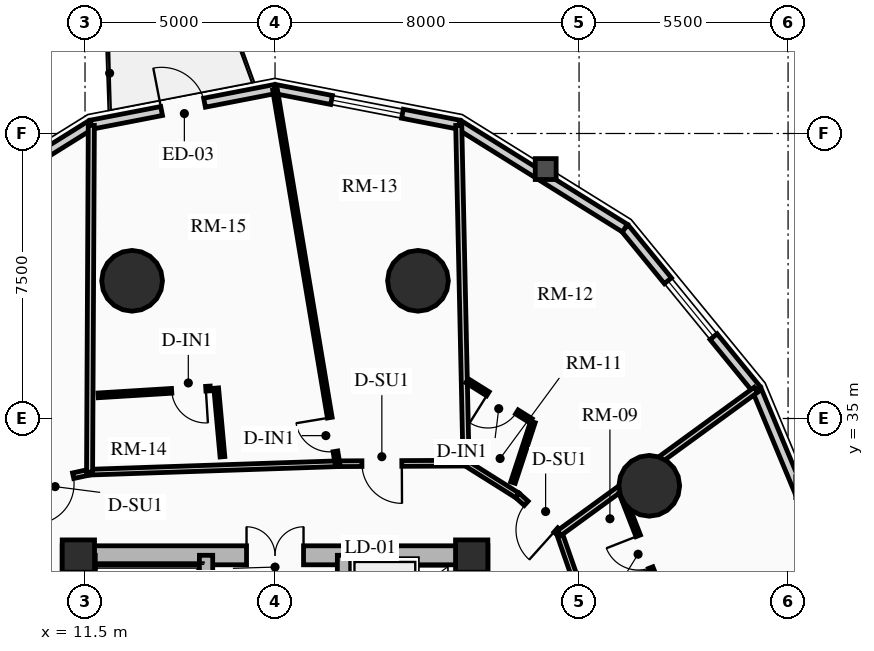
"""IFC4 building model, lengths in metres.
Left out: names, types, materials, properties, quantities, classifications, styles, units other than length and angle.
Written with IfcOpenShell. Run it as: python <this file> out.ifc"""

import sys

from ifc_helpers import new_model, si_unit, direction, frame, frame_2d, origin, origin_2d, place, context, subcontext, project, spatial, rectangle, circle, extrude, source, transform, mapped, element, fill, save


model = new_model("IFC4")
c1 = context("Model", 3, precision=1e-05, world=origin(), true_north=direction((0.0, 1.0)))
c2 = subcontext(c1, "Body", "Model", "MODEL_VIEW")
j1 = project(units=[si_unit("LENGTHUNIT", "METRE"), si_unit("PLANEANGLEUNIT", "RADIAN")], contexts=[c1])
p1 = place(None, origin())
s1 = spatial("IfcSite", under=j1, at=p1, CompositionType="ELEMENT")
p2 = place(p1, origin())
s2 = spatial("IfcBuilding", under=s1, at=p2, CompositionType="ELEMENT")
p3 = place(p2, frame((0.0, 0.0, 51.1)))
s3 = spatial("IfcBuildingStorey", under=s2, at=p3, CompositionType="ELEMENT", Elevation=51.1)
for number, where, z_axis, x_axis in (
    (1, (11.15, 17.35, 0.0), (0.0, 0.0, 1.0), (0.0, 1.0, 0.0)),
    (2, (21.85, 17.35, 0.0), (0.0, 0.0, 1.0), (0.0, 1.0, 0.0)),
):
    element("IfcWall", number, at=place(p3, frame(where, z_axis=z_axis, x_axis=x_axis)), inside=s3, PredefinedType="SHEAR", context=c2, shape_type="SweptSolid", body=[
        extrude(rectangle(XDim=14.3, YDim=0.5, at=frame_2d((7.15, 0.0))), origin(), (0.0, 0.0, 1.0), 2.91),
    ])
p4 = place(p3, frame((11.15, 31.4, 0.0), z_axis=(0.0, 0.0, 1.0), x_axis=(1.0, 0.0, 0.0)))
e3 = element("IfcWall", 3, at=p4, inside=s3, PredefinedType="SHEAR", context=c2, shape_type="SweptSolid", body=[
    extrude(rectangle(XDim=10.7, YDim=0.5, at=frame_2d((5.35, 0.0))), origin(), (0.0, 0.0, 1.0), 2.91),
])
m1 = source(origin(), c2, "Body", "SweptSolid", [
    extrude(rectangle(XDim=1.5, YDim=2.02, at=frame_2d((0.75, 1.01))), frame((0.0, 0.26, 0.0), z_axis=(0.0, -1.0, 0.0), x_axis=(1.0, 0.0, 0.0)), (0.0, 0.0, 1.0), 0.52),
])
p5 = place(p4, frame((4.6, 0.0, 0.0)))
e4 = element("IfcOpeningElement", 4, at=p5, cuts=e3, PredefinedType="OPENING", context=c2, shape_type="MappedRepresentation", body=[
    mapped(m1, transform((0.0, 0.0, 0.0), x_axis=(1.0, 0.0, 0.0), y_axis=(0.0, 1.0, 0.0), z_axis=(0.0, 0.0, 1.0), scale=1.0)),
])
p6 = place(p3, frame((14.685, 17.6, 0.0), z_axis=(0.0, 0.0, 1.0), x_axis=(0.0, 1.0, 0.0)))
e5 = element("IfcWall", 5, at=p6, inside=s3, PredefinedType="SHEAR", context=c2, shape_type="SweptSolid", body=[
    extrude(rectangle(XDim=13.8, YDim=0.35, at=frame_2d((6.9, 0.0))), origin(), (0.0, 0.0, 1.0), 2.91),
])
m2 = source(origin(), c2, "Body", "SweptSolid", [
    extrude(rectangle(XDim=1.1, YDim=2.015, at=frame_2d((0.55, 1.007))), frame((0.0, 0.185, 0.0), z_axis=(0.0, -1.0, 0.0), x_axis=(1.0, 0.0, 0.0)), (0.0, 0.0, 1.0), 0.37),
])
p7 = place(p6, frame((4.9, 0.0, 0.0)))
e6 = element("IfcOpeningElement", 6, at=p7, cuts=e5, PredefinedType="OPENING", context=c2, shape_type="MappedRepresentation", body=[
    mapped(m2, transform((0.0, 0.0, 0.0), x_axis=(1.0, 0.0, 0.0), y_axis=(0.0, 1.0, 0.0), z_axis=(0.0, 0.0, 1.0), scale=1.0)),
])
m3 = source(origin(), c2, "Body", "SweptSolid", [
    extrude(rectangle(XDim=1.15, YDim=2.02, at=frame_2d((0.575, 1.01))), frame((0.0, 0.185, 0.0), z_axis=(0.0, -1.0, 0.0), x_axis=(1.0, 0.0, 0.0)), (0.0, 0.0, 1.0), 0.37),
])
p8 = place(p6, frame((7.32, 0.0, 0.0)))
e7 = element("IfcOpeningElement", 7, at=p8, cuts=e5, PredefinedType="OPENING", context=c2, shape_type="MappedRepresentation", body=[
    mapped(m3, transform((0.0, 0.0, 0.0), x_axis=(1.0, 0.0, 0.0), y_axis=(0.0, 1.0, 0.0), z_axis=(0.0, 0.0, 1.0), scale=1.0)),
])
p9 = place(p3, frame((18.315, 17.6, 0.0), z_axis=(0.0, 0.0, 1.0), x_axis=(0.0, 1.0, 0.0)))
e8 = element("IfcWall", 8, at=p9, inside=s3, PredefinedType="SHEAR", context=c2, shape_type="SweptSolid", body=[
    extrude(rectangle(XDim=13.8, YDim=0.35, at=frame_2d((6.9, 0.0))), origin(), (0.0, 0.0, 1.0), 2.91),
])
p10 = place(p9, frame((10.025, 0.0, 0.0)))
e9 = element("IfcOpeningElement", 9, at=p10, cuts=e8, PredefinedType="OPENING", context=c2, shape_type="MappedRepresentation", body=[
    mapped(m2, transform((0.0, 0.0, 0.0), x_axis=(1.0, 0.0, 0.0), y_axis=(0.0, 1.0, 0.0), z_axis=(0.0, 0.0, 1.0), scale=1.0)),
])
p11 = place(p9, frame((12.025, 0.0, 0.0)))
e10 = element("IfcOpeningElement", 10, at=p11, cuts=e8, PredefinedType="OPENING", context=c2, shape_type="MappedRepresentation", body=[
    mapped(m2, transform((0.0, 0.0, 0.0), x_axis=(1.0, 0.0, 0.0), y_axis=(0.0, 1.0, 0.0), z_axis=(0.0, 0.0, 1.0), scale=1.0)),
])
p12 = place(p9, frame((5.33, 0.0, 0.0)))
e11 = element("IfcOpeningElement", 11, at=p12, cuts=e8, PredefinedType="OPENING", context=c2, shape_type="MappedRepresentation", body=[
    mapped(m3, transform((0.0, 0.0, 0.0), x_axis=(1.0, 0.0, 0.0), y_axis=(0.0, 1.0, 0.0), z_axis=(0.0, 0.0, 1.0), scale=1.0)),
])
p13 = place(p3, frame((11.595, 24.655, 0.0), z_axis=(0.0, 0.0, 1.0), x_axis=(0.0, 1.0, 0.0)))
e12 = element("IfcWall", 12, at=p13, inside=s3, PredefinedType="SHEAR", context=c2, shape_type="SweptSolid", body=[
    extrude(rectangle(XDim=6.745, YDim=0.35, at=frame_2d((3.373, 0.0))), origin(), (0.0, 0.0, 1.0), 2.91),
])
for number, where, z_axis, x_axis in (
    (13, (11.325, 31.38, 0.0), (0.0, 0.0, 1.0), (1.0, 0.0, 0.0)),
    (14, (21.675, 31.38, 0.0), (0.0, 0.0, 1.0), (1.0, 0.0, 0.0)),
):
    element("IfcColumn", number, at=place(p3, frame(where, z_axis=z_axis, x_axis=x_axis)), inside=s3, PredefinedType="COLUMN", context=c2, shape_type="SweptSolid", body=[
        extrude(rectangle(XDim=0.85, YDim=0.85, at=origin_2d()), origin(), (0.0, 0.0, 1.0), 2.91),
    ])
for number, where, z_axis, x_axis in (
    (15, (26.347, 33.229, 0.0), (0.0, 0.0, 1.0), (1.0, 0.0, 0.0)),
    (16, (20.261, 38.623, 0.0), (0.0, 0.0, 1.0), (1.0, 0.0, 0.0)),
    (17, (12.739, 38.623, 0.0), (0.0, 0.0, 1.0), (1.0, 0.0, 0.0)),
):
    element("IfcColumn", number, at=place(p3, frame(where, z_axis=z_axis, x_axis=x_axis)), inside=s3, PredefinedType="USERDEFINED", context=c2, shape_type="SweptSolid", body=[
        extrude(circle(Radius=0.8, at=origin_2d()), origin(), (0.0, 0.0, 1.0), 2.91),
    ])
p14 = place(p3, frame((29.172, 35.768, 0.0), z_axis=(0.0, 0.0, 1.0), x_axis=(0.384348836956, -0.923187939442, 0.0)))
e18 = element("IfcWall", 18, at=p14, inside=s3, PredefinedType="SOLIDWALL", context=c2, shape_type="SweptSolid", body=[
    extrude(rectangle(XDim=5.789, YDim=0.24, at=frame_2d((2.894, 0.0))), origin(), (0.0, 0.0, 1.0), 2.073),
])
p15 = place(p3, frame((25.707, 40.009, 0.0), z_axis=(0.0, 0.0, 1.0), x_axis=(0.632713287022, -0.77438614168, 0.0)))
e19 = element("IfcWall", 19, at=p15, inside=s3, PredefinedType="SOLIDWALL", context=c2, shape_type="SweptSolid", body=[
    extrude(rectangle(XDim=5.477, YDim=0.24, at=frame_2d((2.738, 0.0))), origin(), (0.0, 0.0, 1.0), 2.073),
])
m4 = source(origin(), c2, "Body", "SweptSolid", [
    extrude(rectangle(XDim=1.9, YDim=1.35, at=frame_2d((0.95, 0.675))), frame((0.0, 0.13, 0.0), z_axis=(0.0, -1.0, 0.0), x_axis=(1.0, 0.0, 0.0)), (0.0, 0.0, 1.0), 0.26),
])
p16 = place(p15, frame((1.788, 0.0, 0.65)))
e20 = element("IfcOpeningElement", 20, at=p16, cuts=e19, PredefinedType="OPENING", context=c2, shape_type="MappedRepresentation", body=[
    mapped(m4, transform((0.0, 0.0, 0.0), x_axis=(1.0, 0.0, 0.0), y_axis=(0.0, 1.0, 0.0), z_axis=(0.0, 0.0, 1.0), scale=1.0)),
])
p17 = place(p3, frame((21.34, 42.732, 0.0), z_axis=(0.0, 0.0, 1.0), x_axis=(0.848533613342, -0.529141481107, 0.0)))
e21 = element("IfcWall", 21, at=p17, inside=s3, PredefinedType="SOLIDWALL", context=c2, shape_type="SweptSolid", body=[
    extrude(rectangle(XDim=5.146, YDim=0.24, at=frame_2d((2.573, 0.0))), origin(), (0.0, 0.0, 1.0), 2.073),
])
p18 = place(p3, frame((16.5, 43.67, 0.0), z_axis=(0.0, 0.0, 1.0), x_axis=(0.981725274071, -0.190303668512, 0.0)))
e22 = element("IfcWall", 22, at=p18, inside=s3, PredefinedType="SOLIDWALL", context=c2, shape_type="SweptSolid", body=[
    extrude(rectangle(XDim=4.93, YDim=0.24, at=frame_2d((2.465, 0.0))), origin(), (0.0, 0.0, 1.0), 2.073),
])
p19 = place(p18, frame((1.515, 0.0, 0.65)))
e23 = element("IfcOpeningElement", 23, at=p19, cuts=e22, PredefinedType="OPENING", context=c2, shape_type="MappedRepresentation", body=[
    mapped(m4, transform((0.0, 0.0, 0.0), x_axis=(1.0, 0.0, 0.0), y_axis=(0.0, 1.0, 0.0), z_axis=(0.0, 0.0, 1.0), scale=1.0)),
])
p20 = place(p3, frame((11.66, 42.732, 0.0), z_axis=(0.0, 0.0, 1.0), x_axis=(0.981725274071, 0.190303668512, 0.0)))
e24 = element("IfcWall", 24, at=p20, inside=s3, PredefinedType="SOLIDWALL", context=c2, shape_type="SweptSolid", body=[
    extrude(rectangle(XDim=4.93, YDim=0.24, at=frame_2d((2.465, 0.0))), origin(), (0.0, 0.0, 1.0), 2.073),
])
m5 = source(origin(), c2, "Body", "SweptSolid", [
    extrude(rectangle(XDim=1.15, YDim=2.005, at=frame_2d((0.575, 1.002))), frame((0.0, 0.13, 0.0), z_axis=(0.0, -1.0, 0.0), x_axis=(1.0, 0.0, 0.0)), (0.0, 0.0, 1.0), 0.26),
])
p21 = place(p20, frame((1.89, 0.0, 0.0)))
e25 = element("IfcOpeningElement", 25, at=p21, cuts=e24, PredefinedType="OPENING", context=c2, shape_type="MappedRepresentation", body=[
    mapped(m5, transform((0.0, 0.0, 0.0), x_axis=(1.0, 0.0, 0.0), y_axis=(0.0, 1.0, 0.0), z_axis=(0.0, 0.0, 1.0), scale=1.0)),
])
p22 = place(p3, frame((7.293, 40.009, 0.0), z_axis=(0.0, 0.0, 1.0), x_axis=(0.848533613342, 0.529141481107, 0.0)))
e26 = element("IfcWall", 26, at=p22, inside=s3, PredefinedType="SOLIDWALL", context=c2, shape_type="SweptSolid", body=[
    extrude(rectangle(XDim=5.146, YDim=0.24, at=frame_2d((2.573, 0.0))), origin(), (0.0, 0.0, 1.0), 2.073),
])
p23 = place(p3, frame((24.469, 30.582, 0.0), z_axis=(0.0, 0.0, 1.0), x_axis=(-0.328902536986, 0.944363871166, 0.0)))
e27 = element("IfcWall", 27, at=p23, inside=s3, PredefinedType="PARTITIONING", context=c2, shape_type="SweptSolid", body=[
    extrude(rectangle(XDim=1.488, YDim=0.15, at=frame_2d((0.744, 0.0))), origin(), (0.0, 0.0, 1.0), 2.205),
])
p24 = place(p3, frame((23.98, 31.987, 0.0), z_axis=(0.0, 0.0, 1.0), x_axis=(-0.744317922268, 0.667825449193, 0.0)))
e28 = element("IfcWall", 28, at=p24, inside=s3, PredefinedType="PARTITIONING", context=c2, shape_type="SweptSolid", body=[
    extrude(rectangle(XDim=1.481, YDim=0.15, at=frame_2d((0.74, 0.0))), origin(), (0.0, 0.0, 1.0), 2.159),
])
m6 = source(origin(), c2, "Body", "SweptSolid", [
    extrude(rectangle(XDim=1.05, YDim=2.015, at=frame_2d((0.525, 1.007))), frame((0.0, 0.085, 0.0), z_axis=(0.0, -1.0, 0.0), x_axis=(1.0, 0.0, 0.0)), (0.0, 0.0, 1.0), 0.17),
])
p25 = place(p24, frame((0.12, 0.0, 0.0)))
e29 = element("IfcOpeningElement", 29, at=p25, cuts=e28, PredefinedType="OPENING", context=c2, shape_type="MappedRepresentation", body=[
    mapped(m6, transform((0.0, 0.0, 0.0), x_axis=(1.0, 0.0, 0.0), y_axis=(0.0, 1.0, 0.0), z_axis=(0.0, 0.0, 1.0), scale=1.0)),
])
p26 = place(p3, frame((22.877, 32.976, 0.0), z_axis=(0.0, 0.0, 1.0), x_axis=(-0.846723232687, 0.532033614754, 0.0)))
e30 = element("IfcWall", 30, at=p26, inside=s3, PredefinedType="PARTITIONING", context=c2, shape_type="SweptSolid", body=[
    extrude(rectangle(XDim=1.595, YDim=0.15, at=frame_2d((0.797, 0.0))), origin(), (0.0, 0.0, 1.0), 2.205),
])
p27 = place(p3, frame((21.527, 33.824, 0.0), z_axis=(0.0, 0.0, 1.0), x_axis=(-0.999990631344, -0.00432865146, 0.0)))
e31 = element("IfcWall", 31, at=p27, inside=s3, PredefinedType="PARTITIONING", context=c2, shape_type="SweptSolid", body=[
    extrude(rectangle(XDim=3.384, YDim=0.15, at=frame_2d((1.692, 0.0))), origin(), (0.0, 0.0, 1.0), 2.159),
])
p28 = place(p27, frame((1.69, 0.0, 0.0)))
e32 = element("IfcOpeningElement", 32, at=p28, cuts=e31, PredefinedType="OPENING", context=c2, shape_type="MappedRepresentation", body=[
    mapped(m6, transform((0.0, 0.0, 0.0), x_axis=(1.0, 0.0, 0.0), y_axis=(0.0, 1.0, 0.0), z_axis=(0.0, 0.0, 1.0), scale=1.0)),
])
p29 = place(p3, frame((18.143, 33.81, 0.0), z_axis=(0.0, 0.0, 1.0), x_axis=(-0.999423023908, -0.033964971394, 0.0)))
e33 = element("IfcWall", 33, at=p29, inside=s3, PredefinedType="PARTITIONING", context=c2, shape_type="SweptSolid", body=[
    extrude(rectangle(XDim=6.527, YDim=0.15, at=frame_2d((3.263, 0.0))), origin(), (0.0, 0.0, 1.0), 2.159),
])
p30 = place(p3, frame((11.62, 33.588, 0.0), z_axis=(0.0, 0.0, 1.0), x_axis=(-0.977392314559, -0.211433827571, 0.0)))
e34 = element("IfcWall", 34, at=p30, inside=s3, PredefinedType="PARTITIONING", context=c2, shape_type="SweptSolid", body=[
    extrude(rectangle(XDim=1.934, YDim=0.15, at=frame_2d((0.967, 0.0))), origin(), (0.0, 0.0, 1.0), 2.159),
])
p31 = place(p30, frame((0.442, 0.0, 0.0)))
e35 = element("IfcOpeningElement", 35, at=p31, cuts=e34, PredefinedType="OPENING", context=c2, shape_type="MappedRepresentation", body=[
    mapped(m6, transform((0.0, 0.0, 0.0), x_axis=(1.0, 0.0, 0.0), y_axis=(0.0, 1.0, 0.0), z_axis=(0.0, 0.0, 1.0), scale=1.0)),
])
p32 = place(p3, frame((23.98, 31.987, 0.0), z_axis=(0.0, 0.0, 1.0), x_axis=(0.80834018144, 0.588715679313, 0.0)))
e36 = element("IfcWall", 36, at=p32, inside=s3, PredefinedType="PARTITIONING", context=c2, shape_type="SweptSolid", body=[
    extrude(rectangle(XDim=6.403, YDim=0.16, at=frame_2d((3.202, 0.0))), origin(), (0.0, 0.0, 1.0), 2.073),
])
p33 = place(p3, frame((21.527, 33.824, 0.0), z_axis=(0.0, 0.0, 1.0), x_axis=(-0.021694017061, 0.999764657119, 0.0)))
e37 = element("IfcWall", 37, at=p33, inside=s3, PredefinedType="PARTITIONING", context=c2, shape_type="SweptSolid", body=[
    extrude(rectangle(XDim=8.891, YDim=0.16, at=frame_2d((4.445, 0.0))), origin(), (0.0, 0.0, 1.0), 2.073),
])
p34 = place(p3, frame((11.62, 33.588, 0.0), z_axis=(0.0, 0.0, 1.0), x_axis=(0.005056791532, 0.999987214348, 0.0)))
e38 = element("IfcWall", 38, at=p34, inside=s3, PredefinedType="PARTITIONING", context=c2, shape_type="SweptSolid", body=[
    extrude(rectangle(XDim=9.125, YDim=0.16, at=frame_2d((4.562, 0.0))), origin(), (0.0, 0.0, 1.0), 2.073),
])
p35 = place(p3, frame((26.428, 30.963, 0.0), z_axis=(0.0, 0.0, 1.0), x_axis=(-0.364149471566, 0.931340519014, 0.0)))
e39 = element("IfcWall", 39, at=p35, inside=s3, PredefinedType="PARTITIONING", context=c2, shape_type="SweptSolid", body=[
    extrude(rectangle(XDim=2.247, YDim=0.125, at=frame_2d((1.124, 0.0))), origin(), (0.0, 0.0, 1.0), 2.159),
])
m7 = source(origin(), c2, "Body", "SweptSolid", [
    extrude(rectangle(XDim=0.9, YDim=2.005, at=frame_2d((0.45, 1.002))), frame((0.0, 0.073, 0.0), z_axis=(0.0, -1.0, 0.0), x_axis=(1.0, 0.0, 0.0)), (0.0, 0.0, 1.0), 0.145),
])
p36 = place(p35, frame((0.12, 0.0, 0.0)))
e40 = element("IfcOpeningElement", 40, at=p36, cuts=e39, PredefinedType="OPENING", context=c2, shape_type="MappedRepresentation", body=[
    mapped(m7, transform((0.0, 0.0, 0.0), x_axis=(1.0, 0.0, 0.0), y_axis=(0.0, 1.0, 0.0), z_axis=(0.0, 0.0, 1.0), scale=1.0)),
])
p37 = place(p3, frame((22.76, 33.313, 0.0), z_axis=(0.0, 0.0, 1.0), x_axis=(0.312649886595, 0.949868437423, 0.0)))
e41 = element("IfcWall", 41, at=p37, inside=s3, PredefinedType="PARTITIONING", context=c2, shape_type="SweptSolid", body=[
    extrude(rectangle(XDim=1.68, YDim=0.125, at=frame_2d((0.84, 0.0))), origin(), (0.0, 0.0, 1.0), 2.205),
])
p38 = place(p3, frame((23.233, 34.941, 0.0), z_axis=(0.0, 0.0, 1.0), x_axis=(-0.84760373009, 0.53062973601, 0.0)))
e42 = element("IfcWall", 42, at=p38, inside=s3, PredefinedType="PARTITIONING", context=c2, shape_type="SweptSolid", body=[
    extrude(rectangle(XDim=1.983, YDim=0.125, at=frame_2d((0.991, 0.0))), origin(), (0.0, 0.0, 1.0), 2.635),
])
p39 = place(p38, frame((0.436, 0.0, 0.0)))
e43 = element("IfcOpeningElement", 43, at=p39, cuts=e42, PredefinedType="OPENING", context=c2, shape_type="MappedRepresentation", body=[
    mapped(m7, transform((0.0, 0.0, 0.0), x_axis=(1.0, 0.0, 0.0), y_axis=(0.0, 1.0, 0.0), z_axis=(0.0, 0.0, 1.0), scale=1.0)),
])
p40 = place(p3, frame((18.143, 33.81, 0.0), z_axis=(0.0, 0.0, 1.0), x_axis=(-0.164668829219, 0.986348912243, 0.0)))
e44 = element("IfcWall", 44, at=p40, inside=s3, PredefinedType="PARTITIONING", context=c2, shape_type="SweptSolid", body=[
    extrude(rectangle(XDim=9.977, YDim=0.125, at=frame_2d((4.988, 0.0))), origin(), (0.0, 0.0, 1.0), 2.073),
])
p41 = place(p40, frame((0.33, 0.0, 0.0)))
e45 = element("IfcOpeningElement", 45, at=p41, cuts=e44, PredefinedType="OPENING", context=c2, shape_type="MappedRepresentation", body=[
    mapped(m7, transform((0.0, 0.0, 0.0), x_axis=(1.0, 0.0, 0.0), y_axis=(0.0, 1.0, 0.0), z_axis=(0.0, 0.0, 1.0), scale=1.0)),
])
p42 = place(p3, frame((15.116, 33.993, 0.0), z_axis=(0.0, 0.0, 1.0), x_axis=(-0.090547877021, 0.995892103577, 0.0)))
e46 = element("IfcWall", 46, at=p42, inside=s3, PredefinedType="PARTITIONING", context=c2, shape_type="SweptSolid", body=[
    extrude(rectangle(XDim=1.815, YDim=0.125, at=frame_2d((0.907, 0.0))), origin(), (0.0, 0.0, 1.0), 2.635),
])
p43 = place(p3, frame((14.798, 35.791, 0.0), z_axis=(0.0, 0.0, 1.0), x_axis=(-0.998108365817, -0.06147918417, 0.0)))
e47 = element("IfcWall", 47, at=p43, inside=s3, PredefinedType="PARTITIONING", context=c2, shape_type="SweptSolid", body=[
    extrude(rectangle(XDim=2.958, YDim=0.125, at=frame_2d((1.479, 0.0))), origin(), (0.0, 0.0, 1.0), 2.159),
])
p44 = place(p43, frame((0.12, 0.0, 0.0)))
e48 = element("IfcOpeningElement", 48, at=p44, cuts=e47, PredefinedType="OPENING", context=c2, shape_type="MappedRepresentation", body=[
    mapped(m7, transform((0.0, 0.0, 0.0), x_axis=(1.0, 0.0, 0.0), y_axis=(0.0, 1.0, 0.0), z_axis=(0.0, 0.0, 1.0), scale=1.0)),
])
m8 = source(origin(), c2, "Body", "SweptSolid", [
    extrude(rectangle(XDim=1.9, YDim=1.35, at=frame_2d((0.95, 0.675))), frame((0.0, 0.03, 0.0), z_axis=(0.0, -1.0, 0.0), x_axis=(1.0, 0.0, 0.0)), (0.0, 0.0, 1.0), 0.06),
])
p45 = place(p16, origin())
e49 = element("IfcWindow", 49, at=p45, inside=s3, PartitioningType="DOUBLE_PANEL_VERTICAL", PredefinedType="WINDOW", context=c2, shape_type="MappedRepresentation", body=[
    mapped(m8, transform((0.0, 0.0, 0.0), x_axis=(1.0, 0.0, 0.0), y_axis=(0.0, 1.0, 0.0), z_axis=(0.0, 0.0, 1.0), scale=1.0)),
])
fill(e20, e49)
p46 = place(p19, origin())
e50 = element("IfcWindow", 50, at=p46, inside=s3, PartitioningType="DOUBLE_PANEL_VERTICAL", PredefinedType="WINDOW", context=c2, shape_type="MappedRepresentation", body=[
    mapped(m8, transform((0.0, 0.0, 0.0), x_axis=(1.0, 0.0, 0.0), y_axis=(0.0, 1.0, 0.0), z_axis=(0.0, 0.0, 1.0), scale=1.0)),
])
fill(e23, e50)
m9 = source(origin(), c2, "Body", "SweptSolid", [
    extrude(rectangle(XDim=1.15, YDim=2.005, at=frame_2d((0.575, 1.002))), frame((0.0, 0.025, 0.0), z_axis=(0.0, -1.0, 0.0), x_axis=(1.0, 0.0, 0.0)), (0.0, 0.0, 1.0), 0.05),
])
p47 = place(p21, origin())
e51 = element("IfcDoor", 51, at=p47, inside=s3, OperationType="SINGLE_SWING_LEFT", PredefinedType="DOOR", context=c2, shape_type="MappedRepresentation", body=[
    mapped(m9, transform((0.0, 0.0, 0.0), x_axis=(1.0, 0.0, 0.0), y_axis=(0.0, 1.0, 0.0), z_axis=(0.0, 0.0, 1.0), scale=1.0)),
])
fill(e25, e51)
m10 = source(origin(), c2, "Body", "SweptSolid", [
    extrude(rectangle(XDim=1.5, YDim=2.02, at=frame_2d((0.75, 1.01))), frame((0.0, 0.025, 0.0), z_axis=(0.0, -1.0, 0.0), x_axis=(1.0, 0.0, 0.0)), (0.0, 0.0, 1.0), 0.05),
])
p48 = place(p5, origin())
e52 = element("IfcDoor", 52, at=p48, inside=s3, OperationType="DOUBLE_DOOR_SINGLE_SWING", PredefinedType="DOOR", context=c2, shape_type="MappedRepresentation", body=[
    mapped(m10, transform((0.0, 0.0, 0.0), x_axis=(1.0, 0.0, 0.0), y_axis=(0.0, 1.0, 0.0), z_axis=(0.0, 0.0, 1.0), scale=1.0)),
])
fill(e4, e52)
m11 = source(origin(), c2, "Body", "SweptSolid", [
    extrude(rectangle(XDim=0.9, YDim=2.005, at=frame_2d((0.45, 1.002))), frame((0.0, 0.025, 0.0), z_axis=(0.0, -1.0, 0.0), x_axis=(1.0, 0.0, 0.0)), (0.0, 0.0, 1.0), 0.05),
])
p49 = place(p36, origin())
e53 = element("IfcDoor", 53, at=p49, inside=s3, OperationType="SINGLE_SWING_RIGHT", PredefinedType="DOOR", context=c2, shape_type="MappedRepresentation", body=[
    mapped(m11, transform((0.0, 0.0, 0.0), x_axis=(1.0, 0.0, 0.0), y_axis=(0.0, 1.0, 0.0), z_axis=(0.0, 0.0, 1.0), scale=1.0)),
])
fill(e40, e53)
m12 = source(origin(), c2, "Body", "SweptSolid", [
    extrude(rectangle(XDim=1.05, YDim=2.015, at=frame_2d((0.525, 1.007))), frame((0.0, 0.025, 0.0), z_axis=(0.0, -1.0, 0.0), x_axis=(1.0, 0.0, 0.0)), (0.0, 0.0, 1.0), 0.05),
])
p50 = place(p25, origin())
e54 = element("IfcDoor", 54, at=p50, inside=s3, OperationType="SINGLE_SWING_LEFT", PredefinedType="DOOR", context=c2, shape_type="MappedRepresentation", body=[
    mapped(m12, transform((0.0, 0.0, 0.0), x_axis=(1.0, 0.0, 0.0), y_axis=(0.0, 1.0, 0.0), z_axis=(0.0, 0.0, 1.0), scale=1.0)),
])
fill(e29, e54)
p51 = place(p39, origin())
e55 = element("IfcDoor", 55, at=p51, inside=s3, OperationType="SINGLE_SWING_RIGHT", PredefinedType="DOOR", context=c2, shape_type="MappedRepresentation", body=[
    mapped(m11, transform((0.0, 0.0, 0.0), x_axis=(1.0, 0.0, 0.0), y_axis=(0.0, 1.0, 0.0), z_axis=(0.0, 0.0, 1.0), scale=1.0)),
])
fill(e43, e55)
p52 = place(p28, origin())
e56 = element("IfcDoor", 56, at=p52, inside=s3, OperationType="SINGLE_SWING_LEFT", PredefinedType="DOOR", context=c2, shape_type="MappedRepresentation", body=[
    mapped(m12, transform((0.0, 0.0, 0.0), x_axis=(1.0, 0.0, 0.0), y_axis=(0.0, 1.0, 0.0), z_axis=(0.0, 0.0, 1.0), scale=1.0)),
])
fill(e32, e56)
p53 = place(p41, origin())
e57 = element("IfcDoor", 57, at=p53, inside=s3, OperationType="SINGLE_SWING_RIGHT", PredefinedType="DOOR", context=c2, shape_type="MappedRepresentation", body=[
    mapped(m11, transform((0.0, 0.0, 0.0), x_axis=(1.0, 0.0, 0.0), y_axis=(0.0, 1.0, 0.0), z_axis=(0.0, 0.0, 1.0), scale=1.0)),
])
fill(e45, e57)
p54 = place(p44, origin())
e58 = element("IfcDoor", 58, at=p54, inside=s3, OperationType="SINGLE_SWING_LEFT", PredefinedType="DOOR", context=c2, shape_type="MappedRepresentation", body=[
    mapped(m11, transform((0.0, 0.0, 0.0), x_axis=(1.0, 0.0, 0.0), y_axis=(0.0, 1.0, 0.0), z_axis=(0.0, 0.0, 1.0), scale=1.0)),
])
fill(e48, e58)
p55 = place(p31, origin())
e59 = element("IfcDoor", 59, at=p55, inside=s3, OperationType="SINGLE_SWING_RIGHT", PredefinedType="DOOR", context=c2, shape_type="MappedRepresentation", body=[
    mapped(m12, transform((0.0, 0.0, 0.0), x_axis=(1.0, 0.0, 0.0), y_axis=(0.0, 1.0, 0.0), z_axis=(0.0, 0.0, 1.0), scale=1.0)),
])
fill(e35, e59)
save(model, sys.argv[1])
